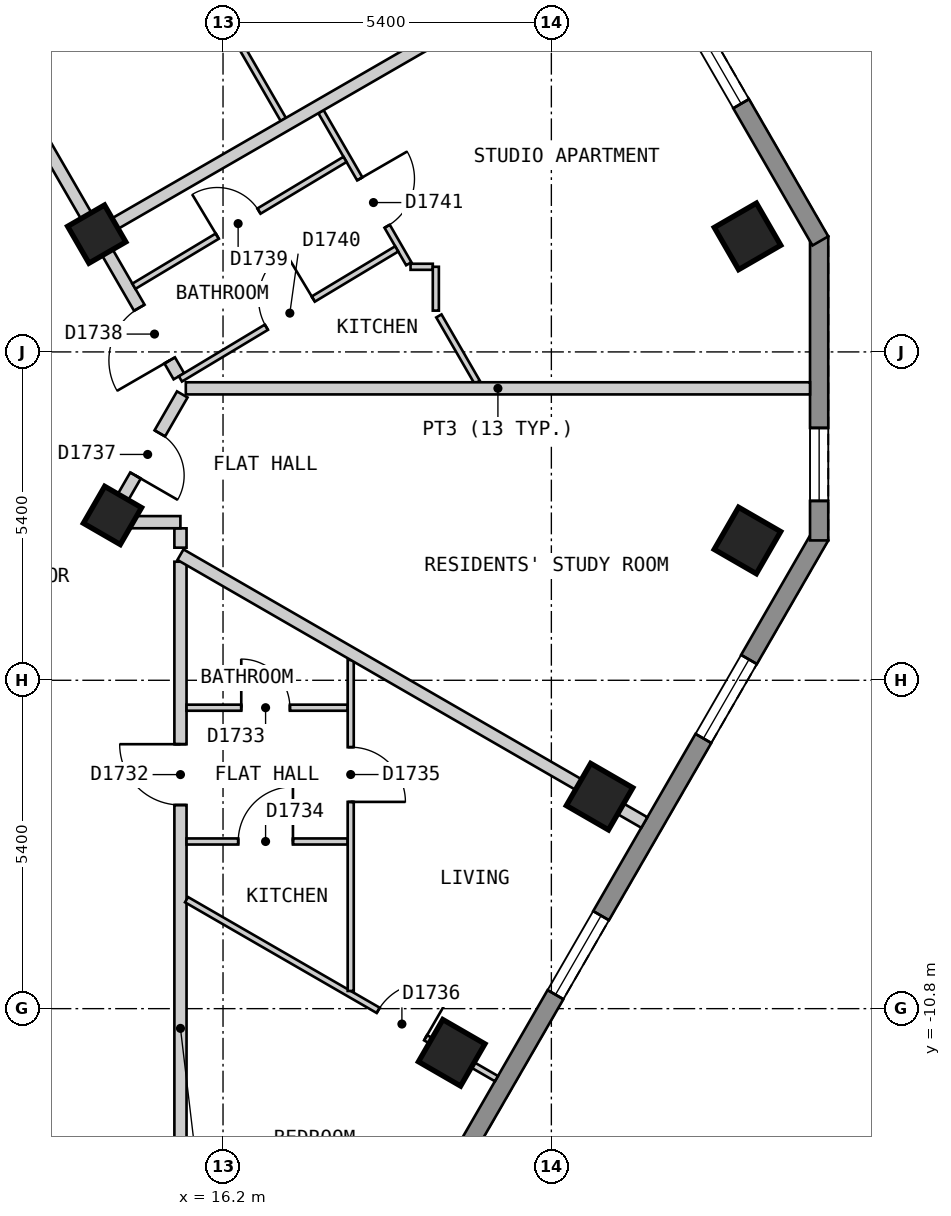
"""IFC4 building model, lengths in metres.
Left out: names, types, materials, properties, quantities, classifications, styles, units other than length and angle.
Written with IfcOpenShell. Run it as: python <this file> out.ifc"""

import sys

from ifc_helpers import new_model, si_unit, direction, frame, frame_2d, origin, origin_2d, place, context, subcontext, project, spatial, polyline, rectangle, outline, extrude, element, fill, save


model = new_model("IFC4")
c1 = context("Model", 3, precision=1e-05, world=origin(), true_north=direction((0.0, 1.0)))
c2 = subcontext(c1, "Body", "Model", "MODEL_VIEW")
j1 = project(units=[si_unit("LENGTHUNIT", "METRE"), si_unit("PLANEANGLEUNIT", "RADIAN")], contexts=[c1])
p1 = place(None, origin())
s1 = spatial("IfcSite", under=j1, at=p1, CompositionType="ELEMENT")
p2 = place(p1, origin())
s2 = spatial("IfcBuilding", under=s1, at=p2, CompositionType="ELEMENT")
p3 = place(p2, frame((0.0, 0.0, 187.2)))
s3 = spatial("IfcBuildingStorey", under=s2, at=p3, CompositionType="ELEMENT", Elevation=187.2)
for number, where, z_axis, x_axis in (
    (1, (19.961, -11.526, 0.0), (0.0, 0.0, 1.0), (0.5, 0.866, 0.0)),
    (2, (22.393, -7.314, 0.0), (0.0, 0.0, 1.0), (0.5, 0.866, 0.0)),
    (3, (24.825, -3.101, 0.0), (0.0, 0.0, 1.0), (0.5, 0.866, 0.0)),
    (4, (24.826, 1.9, 0.0), (0.0, 0.0, 1.0), (-0.5, 0.866, 0.0)),
):
    element("IfcColumn", number, at=place(p3, frame(where, z_axis=z_axis, x_axis=x_axis)), inside=s3, PredefinedType="COLUMN", context=c2, shape_type="SweptSolid", body=[
        extrude(rectangle(XDim=0.8, YDim=0.8, at=origin_2d()), origin(), (0.0, 0.0, 1.0), 3.0),
    ])
for number, where, z_axis, x_axis in (
    (5, (14.382, -2.689, 0.0), (0.0, 0.0, 1.0), (0.5, 0.866, 0.0)),
    (6, (14.123, 1.937, 0.0), (0.0, 0.0, 1.0), (-0.5, 0.866, 0.0)),
):
    element("IfcColumn", number, at=place(p3, frame(where, z_axis=z_axis, x_axis=x_axis)), inside=s3, PredefinedType="COLUMN", context=c2, shape_type="SweptSolid", body=[
        extrude(rectangle(XDim=0.7, YDim=0.7, at=origin_2d()), origin(), (0.0, 0.0, 1.0), 3.0),
    ])
p4 = place(p3, frame((15.631, -21.025, 0.0), z_axis=(0.0, 0.0, 1.0), x_axis=(0.500018670445, 0.86601462413, 0.0)))
e7 = element("IfcWall", 7, at=p4, inside=s3, PredefinedType="SOLIDWALL", context=c2, shape_type="SweptSolid", body=[
    extrude(outline(polyline([(0.0, -0.15), (20.785, -0.15), (20.705, 0.15), (0.08, 0.15), (0.0, -0.15)])), origin(), (0.0, 0.0, 1.0), 2.7),
])
p5 = place(p4, frame((2.346, 0.0, 0.15)))
e8 = element("IfcOpeningElement", 8, at=p5, cuts=e7, PredefinedType="OPENING", context=c2, shape_type="SweptSolid", body=[
    extrude(rectangle(XDim=1.5, YDim=2.1, at=frame_2d((0.75, 1.05))), frame((0.0, 0.16, 0.0), z_axis=(0.0, -1.0, 0.0), x_axis=(1.0, 0.0, 0.0)), (0.0, 0.0, 1.0), 0.32),
])
p6 = place(p4, frame((7.21, 0.0, 0.15)))
e9 = element("IfcOpeningElement", 9, at=p6, cuts=e7, PredefinedType="OPENING", context=c2, shape_type="SweptSolid", body=[
    extrude(rectangle(XDim=1.5, YDim=2.1, at=frame_2d((0.75, 1.05))), frame((0.0, 0.16, 0.0), z_axis=(0.0, -1.0, 0.0), x_axis=(1.0, 0.0, 0.0)), (0.0, 0.0, 1.0), 0.32),
])
p7 = place(p4, frame((12.073, 0.0, 0.15)))
e10 = element("IfcOpeningElement", 10, at=p7, cuts=e7, PredefinedType="OPENING", context=c2, shape_type="SweptSolid", body=[
    extrude(rectangle(XDim=1.5, YDim=2.1, at=frame_2d((0.75, 1.05))), frame((0.0, 0.16, 0.0), z_axis=(0.0, -1.0, 0.0), x_axis=(1.0, 0.0, 0.0)), (0.0, 0.0, 1.0), 0.32),
])
p8 = place(p4, frame((16.938, 0.0, 0.15)))
e11 = element("IfcOpeningElement", 11, at=p8, cuts=e7, PredefinedType="OPENING", context=c2, shape_type="SweptSolid", body=[
    extrude(rectangle(XDim=1.5, YDim=2.1, at=frame_2d((0.75, 1.05))), frame((0.0, 0.16, 0.0), z_axis=(0.0, -1.0, 0.0), x_axis=(1.0, 0.0, 0.0)), (0.0, 0.0, 1.0), 0.32),
])
p9 = place(p3, frame((26.004, -3.1, 0.0), z_axis=(0.0, 0.0, 1.0), x_axis=(0.0, 1.0, 0.0)))
e12 = element("IfcWall", 12, at=p9, inside=s3, PredefinedType="SOLIDWALL", context=c2, shape_type="SweptSolid", body=[
    extrude(outline(polyline([(0.0, -0.15), (5.0, -0.15), (4.92, 0.15), (0.08, 0.15), (0.0, -0.15)])), origin(), (0.0, 0.0, 1.0), 2.7),
])
p10 = place(p9, frame((0.65, 0.0, 0.15)))
e13 = element("IfcOpeningElement", 13, at=p10, cuts=e12, PredefinedType="OPENING", context=c2, shape_type="SweptSolid", body=[
    extrude(rectangle(XDim=1.2, YDim=2.1, at=frame_2d((0.6, 1.05))), frame((0.0, 0.16, 0.0), z_axis=(0.0, -1.0, 0.0), x_axis=(1.0, 0.0, 0.0)), (0.0, 0.0, 1.0), 0.32),
])
p11 = place(p3, frame((26.024, 1.825, 0.0), z_axis=(0.0, 0.0, 1.0), x_axis=(-0.500010537973, 0.866019319597, 0.0)))
e14 = element("IfcWall", 14, at=p11, inside=s3, PredefinedType="SOLIDWALL", context=c2, shape_type="SweptSolid", body=[
    extrude(outline(polyline([(0.0, -0.15), (22.863, -0.15), (22.783, 0.15), (0.08, 0.15), (0.0, -0.15)])), origin(), (0.0, 0.0, 1.0), 2.7),
])
p12 = place(p11, frame((2.606, 0.0, 0.15)))
e15 = element("IfcOpeningElement", 15, at=p12, cuts=e14, PredefinedType="OPENING", context=c2, shape_type="SweptSolid", body=[
    extrude(rectangle(XDim=1.5, YDim=2.1, at=frame_2d((0.75, 1.05))), frame((0.0, 0.16, 0.0), z_axis=(0.0, -1.0, 0.0), x_axis=(1.0, 0.0, 0.0)), (0.0, 0.0, 1.0), 0.32),
])
p13 = place(p11, frame((7.99, 0.0, 0.15)))
e16 = element("IfcOpeningElement", 16, at=p13, cuts=e14, PredefinedType="OPENING", context=c2, shape_type="SweptSolid", body=[
    extrude(rectangle(XDim=1.5, YDim=2.1, at=frame_2d((0.75, 1.05))), frame((0.0, 0.16, 0.0), z_axis=(0.0, -1.0, 0.0), x_axis=(1.0, 0.0, 0.0)), (0.0, 0.0, 1.0), 0.32),
])
p14 = place(p11, frame((13.373, 0.0, 0.15)))
e17 = element("IfcOpeningElement", 17, at=p14, cuts=e14, PredefinedType="OPENING", context=c2, shape_type="SweptSolid", body=[
    extrude(rectangle(XDim=1.5, YDim=2.1, at=frame_2d((0.75, 1.05))), frame((0.0, 0.16, 0.0), z_axis=(0.0, -1.0, 0.0), x_axis=(1.0, 0.0, 0.0)), (0.0, 0.0, 1.0), 0.32),
])
p15 = place(p11, frame((18.758, 0.0, 0.15)))
e18 = element("IfcOpeningElement", 18, at=p15, cuts=e14, PredefinedType="OPENING", context=c2, shape_type="SweptSolid", body=[
    extrude(rectangle(XDim=1.5, YDim=2.1, at=frame_2d((0.75, 1.05))), frame((0.0, 0.16, 0.0), z_axis=(0.0, -1.0, 0.0), x_axis=(1.0, 0.0, 0.0)), (0.0, 0.0, 1.0), 0.32),
])
p16 = place(p3, frame((10.739, 7.8, 0.0), z_axis=(0.0, 0.0, 1.0), x_axis=(0.500023726918, -0.866011704609, 0.0)))
e19 = element("IfcWall", 19, at=p16, inside=s3, PredefinedType="PARTITIONING", context=c2, shape_type="SweptSolid", body=[
    extrude(rectangle(XDim=9.47, YDim=0.2, at=frame_2d((4.735, 0.0))), origin(), (0.0, 0.0, 1.0), 2.7),
])
p17 = place(p16, frame((8.168, 0.0, 0.0)))
e20 = element("IfcOpeningElement", 20, at=p17, cuts=e19, PredefinedType="OPENING", context=c2, shape_type="SweptSolid", body=[
    extrude(rectangle(XDim=1.0, YDim=2.1, at=frame_2d((0.5, 1.05))), frame((0.0, 0.11, 0.0), z_axis=(0.0, -1.0, 0.0), x_axis=(1.0, 0.0, 0.0)), (0.0, 0.0, 1.0), 0.22),
])
p18 = place(p3, frame((15.5, -2.901, 0.0), z_axis=(0.0, 0.0, 1.0), x_axis=(0.0, -1.0, 0.0)))
e21 = element("IfcWall", 21, at=p18, inside=s3, PredefinedType="PARTITIONING", context=c2, shape_type="SweptSolid", body=[
    extrude(rectangle(XDim=0.318, YDim=0.2, at=frame_2d((0.159, 0.0))), origin(), (0.0, 0.0, 1.0), 2.7),
])
p19 = place(p3, frame((14.433, -2.8, 0.0), z_axis=(0.0, 0.0, 1.0), x_axis=(1.0, 0.0, 0.0)))
e22 = element("IfcWall", 22, at=p19, inside=s3, PredefinedType="PARTITIONING", context=c2, shape_type="SweptSolid", body=[
    extrude(rectangle(XDim=1.066, YDim=0.2, at=frame_2d((0.533, 0.0))), origin(), (0.0, 0.0, 1.0), 2.7),
])
p20 = place(p3, frame((14.318, -2.8, 0.0), z_axis=(0.0, 0.0, 1.0), x_axis=(0.49964693309, 0.866229151122, 0.0)))
e23 = element("IfcWall", 23, at=p20, inside=s3, PredefinedType="PARTITIONING", context=c2, shape_type="SweptSolid", body=[
    extrude(rectangle(XDim=2.426, YDim=0.2, at=frame_2d((1.213, 0.0))), origin(), (0.0, 0.0, 1.0), 2.7),
])
p21 = place(p20, frame((0.886, 0.0, 0.0)))
e24 = element("IfcOpeningElement", 24, at=p21, cuts=e23, PredefinedType="OPENING", context=c2, shape_type="SweptSolid", body=[
    extrude(rectangle(XDim=0.8, YDim=2.1, at=frame_2d((0.4, 1.05))), frame((0.0, 0.11, 0.0), z_axis=(0.0, -1.0, 0.0), x_axis=(1.0, 0.0, 0.0)), (0.0, 0.0, 1.0), 0.22),
])
p22 = place(p3, frame((15.5, -18.799, 0.0), z_axis=(0.0, 0.0, 1.0), x_axis=(0.0, 1.0, 0.0)))
e25 = element("IfcWall", 25, at=p22, inside=s3, PredefinedType="PARTITIONING", context=c2, shape_type="SweptSolid", body=[
    extrude(rectangle(XDim=15.349, YDim=0.2, at=frame_2d((7.675, 0.0))), origin(), (0.0, 0.0, 1.0), 2.7),
])
p23 = place(p22, frame((11.348, 0.0, 0.0)))
e26 = element("IfcOpeningElement", 26, at=p23, cuts=e25, PredefinedType="OPENING", context=c2, shape_type="SweptSolid", body=[
    extrude(rectangle(XDim=1.0, YDim=2.1, at=frame_2d((0.5, 1.05))), frame((0.0, 0.11, 0.0), z_axis=(0.0, -1.0, 0.0), x_axis=(1.0, 0.0, 0.0)), (0.0, 0.0, 1.0), 0.22),
])
p24 = place(p3, frame((14.895, 7.8, 0.0), z_axis=(0.0, 0.0, 1.0), x_axis=(0.500050787847, -0.865996079421, 0.0)))
e27 = element("IfcWall", 27, at=p24, inside=s3, PredefinedType="PARTITIONING", context=c2, shape_type="SweptSolid", body=[
    extrude(rectangle(XDim=4.591, YDim=0.1, at=frame_2d((2.296, 0.0))), origin(), (0.0, 0.0, 1.0), 2.7),
])
p25 = place(p3, frame((17.811, 3.951, 0.0), z_axis=(0.0, 0.0, 1.0), x_axis=(0.499976149225, -0.866039173598, 0.0)))
e28 = element("IfcWall", 28, at=p25, inside=s3, PredefinedType="PARTITIONING", context=c2, shape_type="SweptSolid", body=[
    extrude(rectangle(XDim=2.888, YDim=0.1, at=frame_2d((1.444, 0.0))), origin(), (0.0, 0.0, 1.0), 2.7),
])
p26 = place(p25, frame((1.276, 0.0, 0.0)))
e29 = element("IfcOpeningElement", 29, at=p26, cuts=e28, PredefinedType="OPENING", context=c2, shape_type="SweptSolid", body=[
    extrude(rectangle(XDim=0.9, YDim=2.1, at=frame_2d((0.45, 1.05))), frame((0.0, 0.06, 0.0), z_axis=(0.0, -1.0, 0.0), x_axis=(1.0, 0.0, 0.0)), (0.0, 0.0, 1.0), 0.12),
])
p27 = place(p3, frame((19.75, 0.592, 0.0), z_axis=(0.0, 0.0, 1.0), x_axis=(0.499974077718, -0.866040369504, 0.0)))
e30 = element("IfcWall", 30, at=p27, inside=s3, PredefinedType="PARTITIONING", context=c2, shape_type="SweptSolid", body=[
    extrude(rectangle(XDim=1.26, YDim=0.1, at=frame_2d((0.63, 0.0))), origin(), (0.0, 0.0, 1.0), 2.7),
])
p28 = place(p3, frame((15.6, -9.008, 0.0), z_axis=(0.0, 0.0, 1.0), x_axis=(0.866013576751, -0.500020484464, 0.0)))
e31 = element("IfcWall", 31, at=p28, inside=s3, PredefinedType="PARTITIONING", context=c2, shape_type="SweptSolid", body=[
    extrude(rectangle(XDim=5.885, YDim=0.1, at=frame_2d((2.943, 0.0))), origin(), (0.0, 0.0, 1.0), 2.7),
])
p29 = place(p28, frame((3.64, 0.0, 0.0)))
e32 = element("IfcOpeningElement", 32, at=p29, cuts=e31, PredefinedType="OPENING", context=c2, shape_type="SweptSolid", body=[
    extrude(rectangle(XDim=0.9, YDim=2.1, at=frame_2d((0.45, 1.05))), frame((0.0, 0.06, 0.0), z_axis=(0.0, -1.0, 0.0), x_axis=(1.0, 0.0, 0.0)), (0.0, 0.0, 1.0), 0.12),
])
p30 = place(p3, frame((15.6, -5.851, 0.0), z_axis=(0.0, 0.0, 1.0), x_axis=(1.0, 0.0, 0.0)))
e33 = element("IfcWall", 33, at=p30, inside=s3, PredefinedType="PARTITIONING", context=c2, shape_type="SweptSolid", body=[
    extrude(rectangle(XDim=2.65, YDim=0.1, at=frame_2d((1.325, 0.0))), origin(), (0.0, 0.0, 1.0), 2.7),
])
p31 = place(p30, frame((0.9, 0.0, 0.0)))
e34 = element("IfcOpeningElement", 34, at=p31, cuts=e33, PredefinedType="OPENING", context=c2, shape_type="SweptSolid", body=[
    extrude(rectangle(XDim=0.8, YDim=2.1, at=frame_2d((0.4, 1.05))), frame((0.0, 0.06, 0.0), z_axis=(0.0, -1.0, 0.0), x_axis=(1.0, 0.0, 0.0)), (0.0, 0.0, 1.0), 0.12),
])
p32 = place(p3, frame((15.6, -8.051, 0.0), z_axis=(0.0, 0.0, 1.0), x_axis=(1.0, 0.0, 0.0)))
e35 = element("IfcWall", 35, at=p32, inside=s3, PredefinedType="PARTITIONING", context=c2, shape_type="SweptSolid", body=[
    extrude(rectangle(XDim=2.65, YDim=0.1, at=frame_2d((1.325, 0.0))), origin(), (0.0, 0.0, 1.0), 2.7),
])
p33 = place(p32, frame((0.85, 0.0, 0.0)))
e36 = element("IfcOpeningElement", 36, at=p33, cuts=e35, PredefinedType="OPENING", context=c2, shape_type="SweptSolid", body=[
    extrude(rectangle(XDim=0.9, YDim=2.1, at=frame_2d((0.45, 1.05))), frame((0.0, 0.06, 0.0), z_axis=(0.0, -1.0, 0.0), x_axis=(1.0, 0.0, 0.0)), (0.0, 0.0, 1.0), 0.12),
])
p34 = place(p3, frame((19.284, 1.4, 0.0), z_axis=(0.0, 0.0, 1.0), x_axis=(1.0, 0.0, 0.0)))
e37 = element("IfcWall", 37, at=p34, inside=s3, PredefinedType="PARTITIONING", context=c2, shape_type="SweptSolid", body=[
    extrude(rectangle(XDim=0.366, YDim=0.1, at=frame_2d((0.183, 0.0))), origin(), (0.0, 0.0, 1.0), 2.7),
])
p35 = place(p3, frame((18.3, -10.509, 0.0), z_axis=(0.0, 0.0, 1.0), x_axis=(0.0, 1.0, 0.0)))
e38 = element("IfcWall", 38, at=p35, inside=s3, PredefinedType="PARTITIONING", context=c2, shape_type="SweptSolid", body=[
    extrude(rectangle(XDim=5.443, YDim=0.1, at=frame_2d((2.722, 0.0))), origin(), (0.0, 0.0, 1.0), 2.7),
])
p36 = place(p35, frame((3.109, 0.0, 0.0)))
e39 = element("IfcOpeningElement", 39, at=p36, cuts=e38, PredefinedType="OPENING", context=c2, shape_type="SweptSolid", body=[
    extrude(rectangle(XDim=0.9, YDim=2.1, at=frame_2d((0.45, 1.05))), frame((0.0, 0.06, 0.0), z_axis=(0.0, -1.0, 0.0), x_axis=(1.0, 0.0, 0.0)), (0.0, 0.0, 1.0), 0.12),
])
p37 = place(p3, frame((19.7, 0.679, 0.0), z_axis=(0.0, 0.0, 1.0), x_axis=(0.0, 1.0, 0.0)))
e40 = element("IfcWall", 40, at=p37, inside=s3, PredefinedType="PARTITIONING", context=c2, shape_type="SweptSolid", body=[
    extrude(rectangle(XDim=0.721, YDim=0.1, at=frame_2d((0.36, 0.0))), origin(), (0.0, 0.0, 1.0), 2.7),
])
p38 = place(p3, frame((14.734, 1.08, 0.0), z_axis=(0.0, 0.0, 1.0), x_axis=(0.857205608004, 0.514974315482, 0.0)))
e41 = element("IfcWall", 41, at=p38, inside=s3, PredefinedType="PARTITIONING", context=c2, shape_type="SweptSolid", body=[
    extrude(rectangle(XDim=4.051, YDim=0.1, at=frame_2d((2.025, 0.0))), origin(), (0.0, 0.0, 1.0), 2.7),
])
p39 = place(p38, frame((1.6, 0.0, 0.0)))
e42 = element("IfcOpeningElement", 42, at=p39, cuts=e41, PredefinedType="OPENING", context=c2, shape_type="SweptSolid", body=[
    extrude(rectangle(XDim=0.8, YDim=2.1, at=frame_2d((0.4, 1.05))), frame((0.0, 0.06, 0.0), z_axis=(0.0, -1.0, 0.0), x_axis=(1.0, 0.0, 0.0)), (0.0, 0.0, 1.0), 0.12),
])
p40 = place(p3, frame((15.499, -0.444, 0.0), z_axis=(0.0, 0.0, 1.0), x_axis=(0.857061798163, 0.515213619899, 0.0)))
e43 = element("IfcWall", 43, at=p40, inside=s3, PredefinedType="PARTITIONING", context=c2, shape_type="SweptSolid", body=[
    extrude(rectangle(XDim=4.15, YDim=0.1, at=frame_2d((2.075, 0.0))), origin(), (0.0, 0.0, 1.0), 2.7),
])
p41 = place(p40, frame((1.65, 0.0, 0.0)))
e44 = element("IfcOpeningElement", 44, at=p41, cuts=e43, PredefinedType="OPENING", context=c2, shape_type="SweptSolid", body=[
    extrude(rectangle(XDim=0.9, YDim=2.1, at=frame_2d((0.45, 1.05))), frame((0.0, 0.06, 0.0), z_axis=(0.0, -1.0, 0.0), x_axis=(1.0, 0.0, 0.0)), (0.0, 0.0, 1.0), 0.12),
])
p42 = place(p3, frame((15.5, -3.334, 0.0), z_axis=(0.0, 0.0, 1.0), x_axis=(0.866001896501, -0.5000407136, 0.0)))
e45 = element("IfcWall", 45, at=p42, inside=s3, PredefinedType="PARTITIONING", context=c2, shape_type="SweptSolid", body=[
    extrude(rectangle(XDim=8.809, YDim=0.2, at=frame_2d((4.405, 0.0))), origin(), (0.0, 0.0, 1.0), 2.7),
])
p43 = place(p3, frame((15.588, -0.599, 0.0), z_axis=(0.0, 0.0, 1.0), x_axis=(1.0, 0.0, 0.0)))
e46 = element("IfcWall", 46, at=p43, inside=s3, PredefinedType="PARTITIONING", context=c2, shape_type="SweptSolid", body=[
    extrude(rectangle(XDim=10.266, YDim=0.2, at=frame_2d((5.133, 0.0))), origin(), (0.0, 0.0, 1.0), 2.7),
])
p44 = place(p3, frame((14.21, 1.987, 0.0), z_axis=(0.0, 0.0, 1.0), x_axis=(0.866022959057, 0.500004234368, 0.0)))
e47 = element("IfcWall", 47, at=p44, inside=s3, PredefinedType="PARTITIONING", context=c2, shape_type="SweptSolid", body=[
    extrude(rectangle(XDim=10.0, YDim=0.2, at=frame_2d((5.0, 0.0))), origin(), (0.0, 0.0, 1.0), 2.7),
])
p45 = place(p7, origin())
e48 = element("IfcWindow", 48, at=p45, inside=s3, PartitioningType="SINGLE_PANEL", PredefinedType="WINDOW", context=c2, shape_type="SweptSolid", body=[
    extrude(rectangle(XDim=1.5, YDim=2.1, at=frame_2d((0.75, 1.05))), frame((0.0, 0.03, 0.0), z_axis=(0.0, -1.0, 0.0), x_axis=(1.0, 0.0, 0.0)), (0.0, 0.0, 1.0), 0.06),
])
fill(e10, e48)
p46 = place(p8, origin())
e49 = element("IfcWindow", 49, at=p46, inside=s3, PartitioningType="SINGLE_PANEL", PredefinedType="WINDOW", context=c2, shape_type="SweptSolid", body=[
    extrude(rectangle(XDim=1.5, YDim=2.1, at=frame_2d((0.75, 1.05))), frame((0.0, 0.03, 0.0), z_axis=(0.0, -1.0, 0.0), x_axis=(1.0, 0.0, 0.0)), (0.0, 0.0, 1.0), 0.06),
])
fill(e11, e49)
p47 = place(p10, origin())
e50 = element("IfcWindow", 50, at=p47, inside=s3, PartitioningType="SINGLE_PANEL", PredefinedType="WINDOW", context=c2, shape_type="SweptSolid", body=[
    extrude(rectangle(XDim=1.2, YDim=2.1, at=frame_2d((0.6, 1.05))), frame((0.0, 0.03, 0.0), z_axis=(0.0, -1.0, 0.0), x_axis=(1.0, 0.0, 0.0)), (0.0, 0.0, 1.0), 0.06),
])
fill(e13, e50)
p48 = place(p12, origin())
e51 = element("IfcWindow", 51, at=p48, inside=s3, PartitioningType="SINGLE_PANEL", PredefinedType="WINDOW", context=c2, shape_type="SweptSolid", body=[
    extrude(rectangle(XDim=1.5, YDim=2.1, at=frame_2d((0.75, 1.05))), frame((0.0, 0.03, 0.0), z_axis=(0.0, -1.0, 0.0), x_axis=(1.0, 0.0, 0.0)), (0.0, 0.0, 1.0), 0.06),
])
fill(e15, e51)
p49 = place(p23, origin())
e52 = element("IfcDoor", 52, at=p49, inside=s3, OperationType="SINGLE_SWING_RIGHT", PredefinedType="DOOR", context=c2, shape_type="SweptSolid", body=[
    extrude(rectangle(XDim=1.0, YDim=2.1, at=frame_2d((0.5, 1.05))), frame((0.0, 0.025, 0.0), z_axis=(0.0, -1.0, 0.0), x_axis=(1.0, 0.0, 0.0)), (0.0, 0.0, 1.0), 0.05),
])
fill(e26, e52)
p50 = place(p31, origin())
e53 = element("IfcDoor", 53, at=p50, inside=s3, OperationType="SINGLE_SWING_LEFT", PredefinedType="DOOR", context=c2, shape_type="SweptSolid", body=[
    extrude(rectangle(XDim=0.8, YDim=2.1, at=frame_2d((0.4, 1.05))), frame((0.0, 0.025, 0.0), z_axis=(0.0, -1.0, 0.0), x_axis=(1.0, 0.0, 0.0)), (0.0, 0.0, 1.0), 0.05),
])
fill(e34, e53)
p51 = place(p33, origin())
e54 = element("IfcDoor", 54, at=p51, inside=s3, OperationType="SINGLE_SWING_RIGHT", PredefinedType="DOOR", context=c2, shape_type="SweptSolid", body=[
    extrude(rectangle(XDim=0.9, YDim=2.1, at=frame_2d((0.45, 1.05))), frame((0.0, 0.025, 0.0), z_axis=(0.0, -1.0, 0.0), x_axis=(1.0, 0.0, 0.0)), (0.0, 0.0, 1.0), 0.05),
])
fill(e36, e54)
p52 = place(p36, origin())
e55 = element("IfcDoor", 55, at=p52, inside=s3, OperationType="SINGLE_SWING_LEFT", PredefinedType="DOOR", context=c2, shape_type="SweptSolid", body=[
    extrude(rectangle(XDim=0.9, YDim=2.1, at=frame_2d((0.45, 1.05))), frame((0.0, 0.025, 0.0), z_axis=(0.0, -1.0, 0.0), x_axis=(1.0, 0.0, 0.0)), (0.0, 0.0, 1.0), 0.05),
])
fill(e39, e55)
p53 = place(p29, origin())
e56 = element("IfcDoor", 56, at=p53, inside=s3, OperationType="SINGLE_SWING_RIGHT", PredefinedType="DOOR", context=c2, shape_type="SweptSolid", body=[
    extrude(rectangle(XDim=0.9, YDim=2.1, at=frame_2d((0.45, 1.05))), frame((0.0, 0.025, 0.0), z_axis=(0.0, -1.0, 0.0), x_axis=(1.0, 0.0, 0.0)), (0.0, 0.0, 1.0), 0.05),
])
fill(e32, e56)
p54 = place(p21, origin())
e57 = element("IfcDoor", 57, at=p54, inside=s3, OperationType="SINGLE_SWING_LEFT", PredefinedType="DOOR", context=c2, shape_type="SweptSolid", body=[
    extrude(rectangle(XDim=0.8, YDim=2.1, at=frame_2d((0.4, 1.05))), frame((0.0, 0.025, 0.0), z_axis=(0.0, -1.0, 0.0), x_axis=(1.0, 0.0, 0.0)), (0.0, 0.0, 1.0), 0.05),
])
fill(e24, e57)
p55 = place(p17, origin())
e58 = element("IfcDoor", 58, at=p55, inside=s3, OperationType="SINGLE_SWING_RIGHT", PredefinedType="DOOR", context=c2, shape_type="SweptSolid", body=[
    extrude(rectangle(XDim=1.0, YDim=2.1, at=frame_2d((0.5, 1.05))), frame((0.0, 0.025, 0.0), z_axis=(0.0, -1.0, 0.0), x_axis=(1.0, 0.0, 0.0)), (0.0, 0.0, 1.0), 0.05),
])
fill(e20, e58)
p56 = place(p39, origin())
e59 = element("IfcDoor", 59, at=p56, inside=s3, OperationType="SINGLE_SWING_LEFT", PredefinedType="DOOR", context=c2, shape_type="SweptSolid", body=[
    extrude(rectangle(XDim=0.8, YDim=2.1, at=frame_2d((0.4, 1.05))), frame((0.0, 0.025, 0.0), z_axis=(0.0, -1.0, 0.0), x_axis=(1.0, 0.0, 0.0)), (0.0, 0.0, 1.0), 0.05),
])
fill(e42, e59)
p57 = place(p41, origin())
e60 = element("IfcDoor", 60, at=p57, inside=s3, OperationType="SINGLE_SWING_RIGHT", PredefinedType="DOOR", context=c2, shape_type="SweptSolid", body=[
    extrude(rectangle(XDim=0.9, YDim=2.1, at=frame_2d((0.45, 1.05))), frame((0.0, 0.025, 0.0), z_axis=(0.0, -1.0, 0.0), x_axis=(1.0, 0.0, 0.0)), (0.0, 0.0, 1.0), 0.05),
])
fill(e44, e60)
p58 = place(p26, origin())
e61 = element("IfcDoor", 61, at=p58, inside=s3, OperationType="SINGLE_SWING_LEFT", PredefinedType="DOOR", context=c2, shape_type="SweptSolid", body=[
    extrude(rectangle(XDim=0.9, YDim=2.1, at=frame_2d((0.45, 1.05))), frame((0.0, 0.025, 0.0), z_axis=(0.0, -1.0, 0.0), x_axis=(1.0, 0.0, 0.0)), (0.0, 0.0, 1.0), 0.05),
])
fill(e29, e61)
save(model, sys.argv[1])
